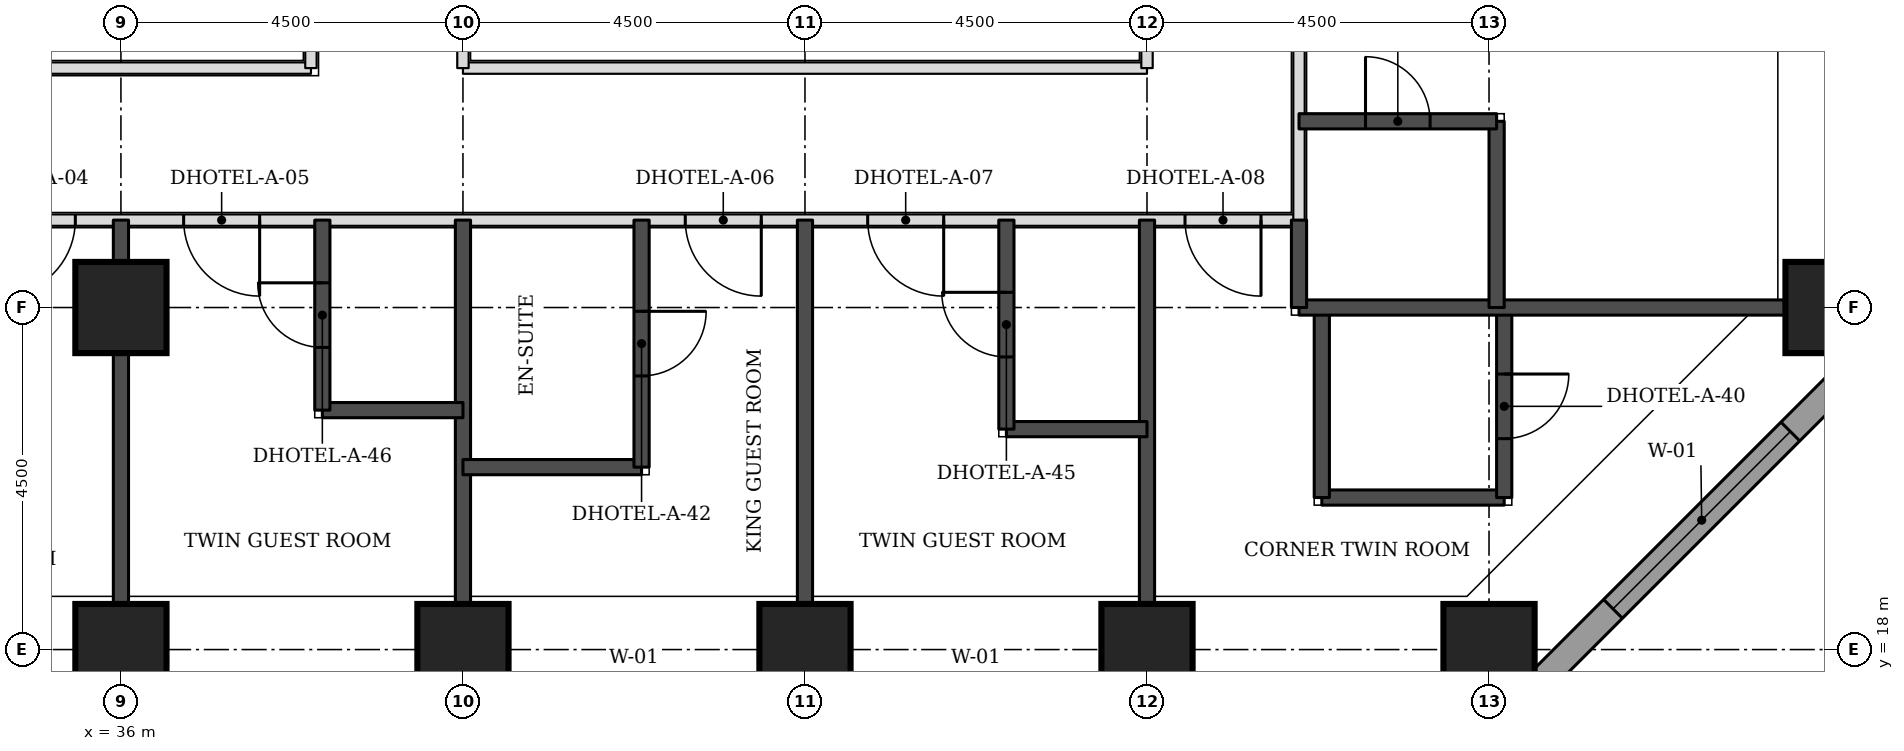
"""IFC4 building model, lengths in metres.
Left out: names, types, materials, properties, quantities, classifications, styles, units other than length and angle.
Written with IfcOpenShell. Run it as: python <this file> out.ifc"""

import sys

from ifc_helpers import new_model, si_unit, direction, frame, frame_2d, origin, origin_2d, place, context, subcontext, project, spatial, rectangle, extrude, element, fill, save


model = new_model("IFC4")
c1 = context("Model", 3, precision=1e-05, world=origin(), true_north=direction((0.0, 1.0)))
c2 = subcontext(c1, "Body", "Model", "MODEL_VIEW")
j1 = project(units=[si_unit("LENGTHUNIT", "METRE"), si_unit("PLANEANGLEUNIT", "RADIAN")], contexts=[c1])
p1 = place(None, origin())
s1 = spatial("IfcSite", under=j1, at=p1, CompositionType="ELEMENT")
p2 = place(p1, origin())
s2 = spatial("IfcBuilding", under=s1, at=p2, CompositionType="ELEMENT")
p3 = place(p2, frame((0.0, 0.0, 49.5)))
s3 = spatial("IfcBuildingStorey", under=s2, at=p3, CompositionType="ELEMENT", Elevation=49.5)
for number, where, z_axis, x_axis in (
    (1, (36.0, 18.0, 0.0), (0.0, 0.0, 1.0), (1.0, 0.0, 0.0)),
    (2, (40.5, 18.0, 0.0), (0.0, 0.0, 1.0), (1.0, 0.0, 0.0)),
    (3, (45.0, 18.0, 0.0), (0.0, 0.0, 1.0), (1.0, 0.0, 0.0)),
    (4, (49.5, 18.0, 0.0), (0.0, 0.0, 1.0), (1.0, 0.0, 0.0)),
    (5, (54.0, 18.0, 0.0), (0.0, 0.0, 1.0), (1.0, 0.0, 0.0)),
    (6, (36.0, 22.5, 0.0), (0.0, 0.0, 1.0), (1.0, 0.0, 0.0)),
    (7, (58.5, 22.5, 0.0), (0.0, 0.0, 1.0), (1.0, 0.0, 0.0)),
):
    element("IfcColumn", number, at=place(p3, frame(where, z_axis=z_axis, x_axis=x_axis)), inside=s3, PredefinedType="COLUMN", context=c2, shape_type="SweptSolid", body=[
        extrude(rectangle(XDim=1.2, YDim=1.2, at=origin_2d()), origin(), (0.0, 0.0, 1.0), 3.3),
    ])
p4 = place(p3, frame((54.27, 17.174, 0.0), z_axis=(0.0, 0.0, 1.0), x_axis=(0.707106781187, 0.707106781187, 0.0)))
e8 = element("IfcWall", 8, at=p4, inside=s3, PredefinedType="STANDARD", context=c2, shape_type="SweptSolid", body=[
    extrude(rectangle(XDim=7.151, YDim=0.35, at=frame_2d((3.576, 0.0))), origin(), (0.0, 0.0, 1.0), 3.055),
])
p5 = place(p4, frame((1.926, 0.0, 0.8)))
e9 = element("IfcOpeningElement", 9, at=p5, cuts=e8, PredefinedType="OPENING", context=c2, shape_type="SweptSolid", body=[
    extrude(rectangle(XDim=3.3, YDim=1.5, at=frame_2d((1.65, 0.75))), frame((0.0, 0.185, 0.0), z_axis=(0.0, -1.0, 0.0), x_axis=(1.0, 0.0, 0.0)), (0.0, 0.0, 1.0), 0.37),
])
p6 = place(p3, frame((19.15, 23.65, 0.0), z_axis=(0.0, 0.0, 1.0), x_axis=(1.0, 0.0, 0.0)))
e10 = element("IfcWall", 10, at=p6, inside=s3, PredefinedType="PARTITIONING", context=c2, shape_type="SweptSolid", body=[
    extrude(rectangle(XDim=32.35, YDim=0.15, at=frame_2d((16.175, 0.0))), origin(), (0.0, 0.0, 1.0), 3.08),
])
p7 = place(p6, frame((6.275, 0.0, 0.0)))
e11 = element("IfcOpeningElement", 11, at=p7, cuts=e10, PredefinedType="OPENING", context=c2, shape_type="SweptSolid", body=[
    extrude(rectangle(XDim=1.0, YDim=2.1, at=frame_2d((0.5, 1.05))), frame((0.0, 0.085, 0.0), z_axis=(0.0, -1.0, 0.0), x_axis=(1.0, 0.0, 0.0)), (0.0, 0.0, 1.0), 0.17),
])
p8 = place(p6, frame((8.675, 0.0, 0.0)))
e12 = element("IfcOpeningElement", 12, at=p8, cuts=e10, PredefinedType="OPENING", context=c2, shape_type="SweptSolid", body=[
    extrude(rectangle(XDim=1.0, YDim=2.1, at=frame_2d((0.5, 1.05))), frame((0.0, 0.085, 0.0), z_axis=(0.0, -1.0, 0.0), x_axis=(1.0, 0.0, 0.0)), (0.0, 0.0, 1.0), 0.17),
])
p9 = place(p6, frame((15.25, 0.0, 0.0)))
e13 = element("IfcOpeningElement", 13, at=p9, cuts=e10, PredefinedType="OPENING", context=c2, shape_type="SweptSolid", body=[
    extrude(rectangle(XDim=1.0, YDim=2.1, at=frame_2d((0.5, 1.05))), frame((0.0, 0.085, 0.0), z_axis=(0.0, -1.0, 0.0), x_axis=(1.0, 0.0, 0.0)), (0.0, 0.0, 1.0), 0.17),
])
p10 = place(p6, frame((17.675, 0.0, 0.0)))
e14 = element("IfcOpeningElement", 14, at=p10, cuts=e10, PredefinedType="OPENING", context=c2, shape_type="SweptSolid", body=[
    extrude(rectangle(XDim=1.0, YDim=2.1, at=frame_2d((0.5, 1.05))), frame((0.0, 0.085, 0.0), z_axis=(0.0, -1.0, 0.0), x_axis=(1.0, 0.0, 0.0)), (0.0, 0.0, 1.0), 0.17),
])
p11 = place(p6, frame((24.275, 0.0, 0.0)))
e15 = element("IfcOpeningElement", 15, at=p11, cuts=e10, PredefinedType="OPENING", context=c2, shape_type="SweptSolid", body=[
    extrude(rectangle(XDim=1.0, YDim=2.1, at=frame_2d((0.5, 1.05))), frame((0.0, 0.085, 0.0), z_axis=(0.0, -1.0, 0.0), x_axis=(1.0, 0.0, 0.0)), (0.0, 0.0, 1.0), 0.17),
])
p12 = place(p6, frame((26.675, 0.0, 0.0)))
e16 = element("IfcOpeningElement", 16, at=p12, cuts=e10, PredefinedType="OPENING", context=c2, shape_type="SweptSolid", body=[
    extrude(rectangle(XDim=1.0, YDim=2.1, at=frame_2d((0.5, 1.05))), frame((0.0, 0.085, 0.0), z_axis=(0.0, -1.0, 0.0), x_axis=(1.0, 0.0, 0.0)), (0.0, 0.0, 1.0), 0.17),
])
p13 = place(p6, frame((1.175, 0.0, 0.0)))
e17 = element("IfcOpeningElement", 17, at=p13, cuts=e10, PredefinedType="OPENING", context=c2, shape_type="SweptSolid", body=[
    extrude(rectangle(XDim=1.0, YDim=2.1, at=frame_2d((0.5, 1.05))), frame((0.0, 0.085, 0.0), z_axis=(0.0, -1.0, 0.0), x_axis=(1.0, 0.0, 0.0)), (0.0, 0.0, 1.0), 0.17),
])
p14 = place(p6, frame((30.85, 0.0, 0.0)))
e18 = element("IfcOpeningElement", 18, at=p14, cuts=e10, PredefinedType="OPENING", context=c2, shape_type="SweptSolid", body=[
    extrude(rectangle(XDim=1.0, YDim=2.1, at=frame_2d((0.5, 1.05))), frame((0.0, 0.085, 0.0), z_axis=(0.0, -1.0, 0.0), x_axis=(1.0, 0.0, 0.0)), (0.0, 0.0, 1.0), 0.17),
])
p15 = place(p3, frame((51.5, 23.65, 0.0), z_axis=(0.0, 0.0, 1.0), x_axis=(0.0, 1.0, 0.0)))
e19 = element("IfcWall", 19, at=p15, inside=s3, PredefinedType="PARTITIONING", context=c2, shape_type="SweptSolid", body=[
    extrude(rectangle(XDim=23.85, YDim=0.15, at=frame_2d((11.925, 0.0))), origin(), (0.0, 0.0, 1.0), 3.08),
])
p16 = place(p15, frame((4.075, 0.0, 0.0)))
e20 = element("IfcOpeningElement", 20, at=p16, cuts=e19, PredefinedType="OPENING", context=c2, shape_type="SweptSolid", body=[
    extrude(rectangle(XDim=1.0, YDim=2.1, at=frame_2d((0.5, 1.05))), frame((0.0, 0.085, 0.0), z_axis=(0.0, -1.0, 0.0), x_axis=(1.0, 0.0, 0.0)), (0.0, 0.0, 1.0), 0.17),
])
p17 = place(p15, frame((10.375, 0.0, 0.0)))
e21 = element("IfcOpeningElement", 21, at=p17, cuts=e19, PredefinedType="OPENING", context=c2, shape_type="SweptSolid", body=[
    extrude(rectangle(XDim=1.0, YDim=2.1, at=frame_2d((0.5, 1.05))), frame((0.0, 0.085, 0.0), z_axis=(0.0, -1.0, 0.0), x_axis=(1.0, 0.0, 0.0)), (0.0, 0.0, 1.0), 0.17),
])
p18 = place(p15, frame((19.9, 0.0, 0.0)))
e22 = element("IfcOpeningElement", 22, at=p18, cuts=e19, PredefinedType="OPENING", context=c2, shape_type="SweptSolid", body=[
    extrude(rectangle(XDim=0.9, YDim=2.1, at=frame_2d((0.45, 1.05))), frame((0.0, 0.085, 0.0), z_axis=(0.0, -1.0, 0.0), x_axis=(1.0, 0.0, 0.0)), (0.0, 0.0, 1.0), 0.17),
])
p19 = place(p3, frame((27.0, 25.65, 0.0), z_axis=(0.0, 0.0, 1.0), x_axis=(1.0, 0.0, 0.0)))
e23 = element("IfcWall", 23, at=p19, inside=s3, PredefinedType="PARTITIONING", context=c2, shape_type="SweptSolid", body=[
    extrude(rectangle(XDim=11.5, YDim=0.15, at=frame_2d((5.75, 0.0))), origin(), (0.0, 0.0, 1.0), 3.08),
])
p20 = place(p3, frame((38.5, 25.65, 0.0), z_axis=(0.0, 0.0, 1.0), x_axis=(0.0, 1.0, 0.0)))
e24 = element("IfcWall", 24, at=p20, inside=s3, PredefinedType="PARTITIONING", context=c2, shape_type="SweptSolid", body=[
    extrude(rectangle(XDim=14.85, YDim=0.15, at=frame_2d((7.425, 0.0))), origin(), (0.0, 0.0, 1.0), 3.08),
])
p21 = place(p20, frame((6.975, 0.0, 0.0)))
e25 = element("IfcOpeningElement", 25, at=p21, cuts=e24, PredefinedType="OPENING", context=c2, shape_type="SweptSolid", body=[
    extrude(rectangle(XDim=0.9, YDim=2.1, at=frame_2d((0.45, 1.05))), frame((0.0, 0.085, 0.0), z_axis=(0.0, -1.0, 0.0), x_axis=(1.0, 0.0, 0.0)), (0.0, 0.0, 1.0), 0.17),
])
p22 = place(p3, frame((40.5, 25.65, 0.0), z_axis=(0.0, 0.0, 1.0), x_axis=(1.0, 0.0, 0.0)))
e26 = element("IfcWall", 26, at=p22, inside=s3, PredefinedType="PARTITIONING", context=c2, shape_type="SweptSolid", body=[
    extrude(rectangle(XDim=9.0, YDim=0.15, at=frame_2d((4.5, 0.0))), origin(), (0.0, 0.0, 1.0), 3.08),
])
for number, where, z_axis, x_axis in (
    (27, (40.5, 25.65, 0.0), (0.0, 0.0, 1.0), (0.0, 1.0, 0.0)),
    (28, (49.5, 25.65, 0.0), (0.0, 0.0, 1.0), (0.0, 1.0, 0.0)),
):
    element("IfcWall", number, at=place(p3, frame(where, z_axis=z_axis, x_axis=x_axis)), inside=s3, PredefinedType="PARTITIONING", context=c2, shape_type="SweptSolid", body=[
        extrude(rectangle(XDim=3.85, YDim=0.15, at=frame_2d((1.925, 0.0))), origin(), (0.0, 0.0, 1.0), 3.08),
    ])
for number, where, z_axis, x_axis in (
    (29, (36.0, 18.6, 0.0), (0.0, 0.0, 1.0), (0.0, 1.0, 0.0)),
    (30, (40.5, 18.6, 0.0), (0.0, 0.0, 1.0), (0.0, 1.0, 0.0)),
    (31, (45.0, 18.6, 0.0), (0.0, 0.0, 1.0), (0.0, 1.0, 0.0)),
    (32, (49.5, 18.6, 0.0), (0.0, 0.0, 1.0), (0.0, 1.0, 0.0)),
):
    element("IfcWall", number, at=place(p3, frame(where, z_axis=z_axis, x_axis=x_axis)), inside=s3, PredefinedType="SOLIDWALL", context=c2, shape_type="SweptSolid", body=[
        extrude(rectangle(XDim=5.05, YDim=0.2, at=frame_2d((2.525, 0.0))), origin(), (0.0, 0.0, 1.0), 3.08),
    ])
p23 = place(p3, frame((51.8, 20.0, 0.0), z_axis=(0.0, 0.0, 1.0), x_axis=(1.0, 0.0, 0.0)))
e33 = element("IfcWall", 33, at=p23, inside=s3, PredefinedType="SOLIDWALL", context=c2, shape_type="SweptSolid", body=[
    extrude(rectangle(XDim=2.4, YDim=0.2, at=frame_2d((1.2, 0.0))), origin(), (0.0, 0.0, 1.0), 3.08),
])
p24 = place(p3, frame((51.8, 20.0, 0.0), z_axis=(0.0, 0.0, 1.0), x_axis=(0.0, 1.0, 0.0)))
e34 = element("IfcWall", 34, at=p24, inside=s3, PredefinedType="SOLIDWALL", context=c2, shape_type="SweptSolid", body=[
    extrude(rectangle(XDim=2.5, YDim=0.2, at=frame_2d((1.25, 0.0))), origin(), (0.0, 0.0, 1.0), 3.08),
])
p25 = place(p3, frame((54.2, 20.0, 0.0), z_axis=(0.0, 0.0, 1.0), x_axis=(0.0, 1.0, 0.0)))
e35 = element("IfcWall", 35, at=p25, inside=s3, PredefinedType="SOLIDWALL", context=c2, shape_type="SweptSolid", body=[
    extrude(rectangle(XDim=2.5, YDim=0.2, at=frame_2d((1.25, 0.0))), origin(), (0.0, 0.0, 1.0), 3.08),
])
p26 = place(p25, frame((0.775, 0.0, 0.0)))
e36 = element("IfcOpeningElement", 36, at=p26, cuts=e35, PredefinedType="OPENING", context=c2, shape_type="SweptSolid", body=[
    extrude(rectangle(XDim=0.85, YDim=2.1, at=frame_2d((0.425, 1.05))), frame((0.0, 0.11, 0.0), z_axis=(0.0, -1.0, 0.0), x_axis=(1.0, 0.0, 0.0)), (0.0, 0.0, 1.0), 0.22),
])
p27 = place(p3, frame((40.5, 20.4, 0.0), z_axis=(0.0, 0.0, 1.0), x_axis=(1.0, 0.0, 0.0)))
e37 = element("IfcWall", 37, at=p27, inside=s3, PredefinedType="SOLIDWALL", context=c2, shape_type="SweptSolid", body=[
    extrude(rectangle(XDim=2.35, YDim=0.2, at=frame_2d((1.175, 0.0))), origin(), (0.0, 0.0, 1.0), 3.08),
])
p28 = place(p3, frame((42.85, 20.4, 0.0), z_axis=(0.0, 0.0, 1.0), x_axis=(0.0, 1.0, 0.0)))
e38 = element("IfcWall", 38, at=p28, inside=s3, PredefinedType="SOLIDWALL", context=c2, shape_type="SweptSolid", body=[
    extrude(rectangle(XDim=3.25, YDim=0.2, at=frame_2d((1.625, 0.0))), origin(), (0.0, 0.0, 1.0), 3.08),
])
p29 = place(p28, frame((1.2, 0.0, 0.0)))
e39 = element("IfcOpeningElement", 39, at=p29, cuts=e38, PredefinedType="OPENING", context=c2, shape_type="SweptSolid", body=[
    extrude(rectangle(XDim=0.85, YDim=2.1, at=frame_2d((0.425, 1.05))), frame((0.0, 0.11, 0.0), z_axis=(0.0, -1.0, 0.0), x_axis=(1.0, 0.0, 0.0)), (0.0, 0.0, 1.0), 0.22),
])
p30 = place(p3, frame((47.65, 20.9, 0.0), z_axis=(0.0, 0.0, 1.0), x_axis=(1.0, 0.0, 0.0)))
e40 = element("IfcWall", 40, at=p30, inside=s3, PredefinedType="SOLIDWALL", context=c2, shape_type="SweptSolid", body=[
    extrude(rectangle(XDim=1.85, YDim=0.2, at=frame_2d((0.925, 0.0))), origin(), (0.0, 0.0, 1.0), 3.08),
])
p31 = place(p3, frame((47.65, 20.9, 0.0), z_axis=(0.0, 0.0, 1.0), x_axis=(0.0, 1.0, 0.0)))
e41 = element("IfcWall", 41, at=p31, inside=s3, PredefinedType="SOLIDWALL", context=c2, shape_type="SweptSolid", body=[
    extrude(rectangle(XDim=2.75, YDim=0.2, at=frame_2d((1.375, 0.0))), origin(), (0.0, 0.0, 1.0), 3.08),
])
p32 = place(p31, frame((0.95, 0.0, 0.0)))
e42 = element("IfcOpeningElement", 42, at=p32, cuts=e41, PredefinedType="OPENING", context=c2, shape_type="SweptSolid", body=[
    extrude(rectangle(XDim=0.85, YDim=2.1, at=frame_2d((0.425, 1.05))), frame((0.0, 0.11, 0.0), z_axis=(0.0, -1.0, 0.0), x_axis=(1.0, 0.0, 0.0)), (0.0, 0.0, 1.0), 0.22),
])
p33 = place(p3, frame((38.65, 21.15, 0.0), z_axis=(0.0, 0.0, 1.0), x_axis=(1.0, 0.0, 0.0)))
e43 = element("IfcWall", 43, at=p33, inside=s3, PredefinedType="SOLIDWALL", context=c2, shape_type="SweptSolid", body=[
    extrude(rectangle(XDim=1.85, YDim=0.2, at=frame_2d((0.925, 0.0))), origin(), (0.0, 0.0, 1.0), 3.08),
])
p34 = place(p3, frame((38.65, 21.15, 0.0), z_axis=(0.0, 0.0, 1.0), x_axis=(0.0, 1.0, 0.0)))
e44 = element("IfcWall", 44, at=p34, inside=s3, PredefinedType="SOLIDWALL", context=c2, shape_type="SweptSolid", body=[
    extrude(rectangle(XDim=2.5, YDim=0.2, at=frame_2d((1.25, 0.0))), origin(), (0.0, 0.0, 1.0), 3.08),
])
p35 = place(p34, frame((0.825, 0.0, 0.0)))
e45 = element("IfcOpeningElement", 45, at=p35, cuts=e44, PredefinedType="OPENING", context=c2, shape_type="SweptSolid", body=[
    extrude(rectangle(XDim=0.85, YDim=2.1, at=frame_2d((0.425, 1.05))), frame((0.0, 0.11, 0.0), z_axis=(0.0, -1.0, 0.0), x_axis=(1.0, 0.0, 0.0)), (0.0, 0.0, 1.0), 0.22),
])
p36 = place(p3, frame((51.5, 22.5, 0.0), z_axis=(0.0, 0.0, 1.0), x_axis=(1.0, 0.0, 0.0)))
e46 = element("IfcWall", 46, at=p36, inside=s3, PredefinedType="SOLIDWALL", context=c2, shape_type="SweptSolid", body=[
    extrude(rectangle(XDim=6.4, YDim=0.2, at=frame_2d((3.2, 0.0))), origin(), (0.0, 0.0, 1.0), 3.08),
])
p37 = place(p3, frame((51.5, 22.5, 0.0), z_axis=(0.0, 0.0, 1.0), x_axis=(0.0, 1.0, 0.0)))
e47 = element("IfcWall", 47, at=p37, inside=s3, PredefinedType="SOLIDWALL", context=c2, shape_type="SweptSolid", body=[
    extrude(rectangle(XDim=1.15, YDim=0.2, at=frame_2d((0.575, 0.0))), origin(), (0.0, 0.0, 1.0), 3.08),
])
p38 = place(p3, frame((54.1, 22.5, 0.0), z_axis=(0.0, 0.0, 1.0), x_axis=(0.0, 1.0, 0.0)))
e48 = element("IfcWall", 48, at=p38, inside=s3, PredefinedType="SOLIDWALL", context=c2, shape_type="SweptSolid", body=[
    extrude(rectangle(XDim=2.45, YDim=0.2, at=frame_2d((1.225, 0.0))), origin(), (0.0, 0.0, 1.0), 3.08),
])
p39 = place(p3, frame((51.5, 24.95, 0.0), z_axis=(0.0, 0.0, 1.0), x_axis=(1.0, 0.0, 0.0)))
e49 = element("IfcWall", 49, at=p39, inside=s3, PredefinedType="SOLIDWALL", context=c2, shape_type="SweptSolid", body=[
    extrude(rectangle(XDim=2.6, YDim=0.2, at=frame_2d((1.3, 0.0))), origin(), (0.0, 0.0, 1.0), 3.08),
])
p40 = place(p39, frame((0.875, 0.0, 0.0)))
e50 = element("IfcOpeningElement", 50, at=p40, cuts=e49, PredefinedType="OPENING", context=c2, shape_type="SweptSolid", body=[
    extrude(rectangle(XDim=0.85, YDim=2.1, at=frame_2d((0.425, 1.05))), frame((0.0, 0.11, 0.0), z_axis=(0.0, -1.0, 0.0), x_axis=(1.0, 0.0, 0.0)), (0.0, 0.0, 1.0), 0.22),
])
p41 = place(p5, origin())
e51 = element("IfcWindow", 51, at=p41, inside=s3, PartitioningType="SINGLE_PANEL", PredefinedType="WINDOW", context=c2, shape_type="SweptSolid", body=[
    extrude(rectangle(XDim=3.3, YDim=1.5, at=frame_2d((1.65, 0.75))), frame((0.0, 0.085, 0.0), z_axis=(0.0, -1.0, 0.0), x_axis=(1.0, 0.0, 0.0)), (0.0, 0.0, 1.0), 0.06),
])
fill(e9, e51)
p42 = place(p9, frame((1.0, 0.0, 0.0), z_axis=(0.0, 0.0, 1.0), x_axis=(-1.0, 0.0, 0.0)))
e52 = element("IfcDoor", 52, at=p42, inside=s3, OperationType="SINGLE_SWING_RIGHT", PredefinedType="DOOR", context=c2, shape_type="SweptSolid", body=[
    extrude(rectangle(XDim=1.0, YDim=2.1, at=frame_2d((0.5, 1.05))), frame((0.0, 0.025, 0.0), z_axis=(0.0, -1.0, 0.0), x_axis=(1.0, 0.0, 0.0)), (0.0, 0.0, 1.0), 0.05),
])
fill(e13, e52)
p43 = place(p10, frame((1.0, 0.0, 0.0), z_axis=(0.0, 0.0, 1.0), x_axis=(-1.0, 0.0, 0.0)))
e53 = element("IfcDoor", 53, at=p43, inside=s3, OperationType="SINGLE_SWING_LEFT", PredefinedType="DOOR", context=c2, shape_type="SweptSolid", body=[
    extrude(rectangle(XDim=1.0, YDim=2.1, at=frame_2d((0.5, 1.05))), frame((0.0, 0.025, 0.0), z_axis=(0.0, -1.0, 0.0), x_axis=(1.0, 0.0, 0.0)), (0.0, 0.0, 1.0), 0.05),
])
fill(e14, e53)
p44 = place(p35, origin())
e54 = element("IfcDoor", 54, at=p44, inside=s3, OperationType="SINGLE_SWING_RIGHT", PredefinedType="DOOR", context=c2, shape_type="SweptSolid", body=[
    extrude(rectangle(XDim=0.85, YDim=2.1, at=frame_2d((0.425, 1.05))), frame((0.0, 0.025, 0.0), z_axis=(0.0, -1.0, 0.0), x_axis=(1.0, 0.0, 0.0)), (0.0, 0.0, 1.0), 0.05),
])
fill(e45, e54)
p45 = place(p11, frame((1.0, 0.0, 0.0), z_axis=(0.0, 0.0, 1.0), x_axis=(-1.0, 0.0, 0.0)))
e55 = element("IfcDoor", 55, at=p45, inside=s3, OperationType="SINGLE_SWING_LEFT", PredefinedType="DOOR", context=c2, shape_type="SweptSolid", body=[
    extrude(rectangle(XDim=1.0, YDim=2.1, at=frame_2d((0.5, 1.05))), frame((0.0, 0.025, 0.0), z_axis=(0.0, -1.0, 0.0), x_axis=(1.0, 0.0, 0.0)), (0.0, 0.0, 1.0), 0.05),
])
fill(e15, e55)
p46 = place(p29, frame((0.85, 0.0, 0.0), z_axis=(0.0, 0.0, 1.0), x_axis=(-1.0, 0.0, 0.0)))
e56 = element("IfcDoor", 56, at=p46, inside=s3, OperationType="SINGLE_SWING_LEFT", PredefinedType="DOOR", context=c2, shape_type="SweptSolid", body=[
    extrude(rectangle(XDim=0.85, YDim=2.1, at=frame_2d((0.425, 1.05))), frame((0.0, 0.025, 0.0), z_axis=(0.0, -1.0, 0.0), x_axis=(1.0, 0.0, 0.0)), (0.0, 0.0, 1.0), 0.05),
])
fill(e39, e56)
p47 = place(p12, frame((1.0, 0.0, 0.0), z_axis=(0.0, 0.0, 1.0), x_axis=(-1.0, 0.0, 0.0)))
e57 = element("IfcDoor", 57, at=p47, inside=s3, OperationType="SINGLE_SWING_LEFT", PredefinedType="DOOR", context=c2, shape_type="SweptSolid", body=[
    extrude(rectangle(XDim=1.0, YDim=2.1, at=frame_2d((0.5, 1.05))), frame((0.0, 0.025, 0.0), z_axis=(0.0, -1.0, 0.0), x_axis=(1.0, 0.0, 0.0)), (0.0, 0.0, 1.0), 0.05),
])
fill(e16, e57)
p48 = place(p32, origin())
e58 = element("IfcDoor", 58, at=p48, inside=s3, OperationType="SINGLE_SWING_RIGHT", PredefinedType="DOOR", context=c2, shape_type="SweptSolid", body=[
    extrude(rectangle(XDim=0.85, YDim=2.1, at=frame_2d((0.425, 1.05))), frame((0.0, 0.025, 0.0), z_axis=(0.0, -1.0, 0.0), x_axis=(1.0, 0.0, 0.0)), (0.0, 0.0, 1.0), 0.05),
])
fill(e42, e58)
p49 = place(p40, origin())
e59 = element("IfcDoor", 59, at=p49, inside=s3, OperationType="SINGLE_SWING_LEFT", PredefinedType="DOOR", context=c2, shape_type="SweptSolid", body=[
    extrude(rectangle(XDim=0.85, YDim=2.1, at=frame_2d((0.425, 1.05))), frame((0.0, 0.025, 0.0), z_axis=(0.0, -1.0, 0.0), x_axis=(1.0, 0.0, 0.0)), (0.0, 0.0, 1.0), 0.05),
])
fill(e50, e59)
p50 = place(p14, frame((1.0, 0.0, 0.0), z_axis=(0.0, 0.0, 1.0), x_axis=(-1.0, 0.0, 0.0)))
e60 = element("IfcDoor", 60, at=p50, inside=s3, OperationType="SINGLE_SWING_LEFT", PredefinedType="DOOR", context=c2, shape_type="SweptSolid", body=[
    extrude(rectangle(XDim=1.0, YDim=2.1, at=frame_2d((0.5, 1.05))), frame((0.0, 0.025, 0.0), z_axis=(0.0, -1.0, 0.0), x_axis=(1.0, 0.0, 0.0)), (0.0, 0.0, 1.0), 0.05),
])
fill(e18, e60)
p51 = place(p26, frame((0.85, 0.0, 0.0), z_axis=(0.0, 0.0, 1.0), x_axis=(-1.0, 0.0, 0.0)))
e61 = element("IfcDoor", 61, at=p51, inside=s3, OperationType="SINGLE_SWING_LEFT", PredefinedType="DOOR", context=c2, shape_type="SweptSolid", body=[
    extrude(rectangle(XDim=0.85, YDim=2.1, at=frame_2d((0.425, 1.05))), frame((0.0, 0.025, 0.0), z_axis=(0.0, -1.0, 0.0), x_axis=(1.0, 0.0, 0.0)), (0.0, 0.0, 1.0), 0.05),
])
fill(e36, e61)
save(model, sys.argv[1])
